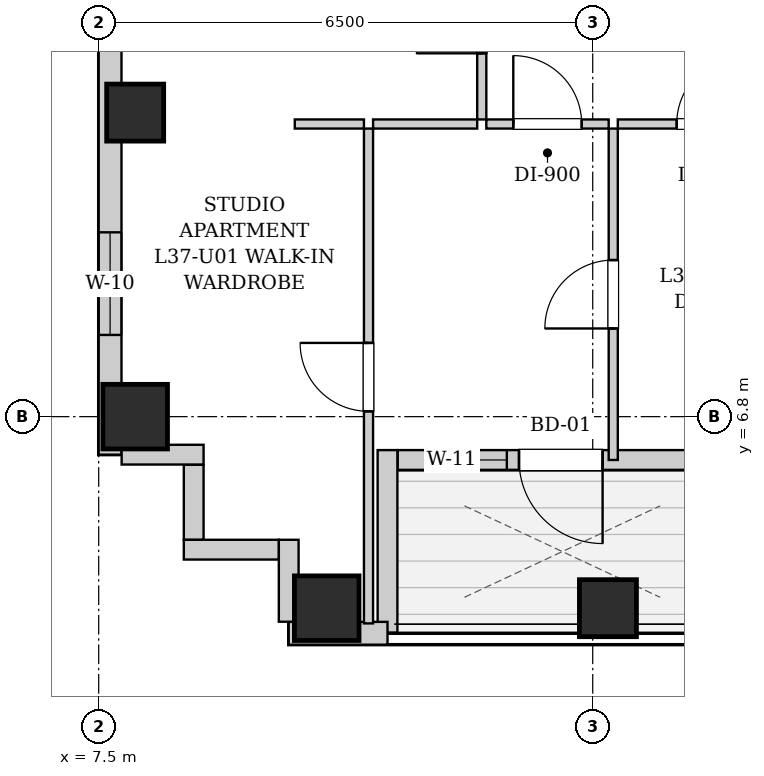
"""IFC4 building model, lengths in metres.
Left out: names, types, materials, properties, quantities, classifications, styles, units other than length and angle.
Written with IfcOpenShell. Run it as: python <this file> out.ifc"""

import sys

from ifc_helpers import new_model, si_unit, direction, frame, frame_2d, origin, origin_2d, place, context, subcontext, project, spatial, rectangle, extrude, element, fill, save


model = new_model("IFC4")
c1 = context("Model", 3, precision=1e-05, world=origin(), true_north=direction((0.0, 1.0)))
c2 = subcontext(c1, "Body", "Model", "MODEL_VIEW")
j1 = project(units=[si_unit("LENGTHUNIT", "METRE"), si_unit("PLANEANGLEUNIT", "RADIAN")], contexts=[c1])
p1 = place(None, origin())
s1 = spatial("IfcSite", under=j1, at=p1, CompositionType="ELEMENT")
p2 = place(p1, origin())
s2 = spatial("IfcBuilding", under=s1, at=p2, CompositionType="ELEMENT")
p3 = place(p2, frame((0.0, 0.0, 130.9)))
s3 = spatial("IfcBuildingStorey", under=s2, at=p3, CompositionType="ELEMENT", Elevation=130.9)
p4 = place(p3, frame((10.5, 4.28, 0.0), z_axis=(0.0, 0.0, 1.0), x_axis=(1.0, 0.0, 0.0)))
e1 = element("IfcColumn", 1, at=p4, inside=s3, PredefinedType="COLUMN", context=c2, shape_type="SweptSolid", body=[
    extrude(rectangle(XDim=0.85, YDim=0.85, at=origin_2d()), origin(), (0.0, 0.0, 1.0), 3.25),
])
p5 = place(p3, frame((14.2, 4.28, 0.0), z_axis=(0.0, 0.0, 1.0), x_axis=(1.0, 0.0, 0.0)))
e2 = element("IfcColumn", 2, at=p5, inside=s3, PredefinedType="COLUMN", context=c2, shape_type="SweptSolid", body=[
    extrude(rectangle(XDim=0.75, YDim=0.75, at=origin_2d()), origin(), (0.0, 0.0, 1.0), 3.25),
])
p6 = place(p3, frame((7.98, 6.8, 0.0), z_axis=(0.0, 0.0, 1.0), x_axis=(1.0, 0.0, 0.0)))
e3 = element("IfcColumn", 3, at=p6, inside=s3, PredefinedType="COLUMN", context=c2, shape_type="SweptSolid", body=[
    extrude(rectangle(XDim=0.85, YDim=0.85, at=origin_2d()), origin(), (0.0, 0.0, 1.0), 3.25),
])
p7 = place(p3, frame((7.98, 10.8, 0.0), z_axis=(0.0, 0.0, 1.0), x_axis=(1.0, 0.0, 0.0)))
e4 = element("IfcColumn", 4, at=p7, inside=s3, PredefinedType="COLUMN", context=c2, shape_type="SweptSolid", body=[
    extrude(rectangle(XDim=0.75, YDim=0.75, at=origin_2d()), origin(), (0.0, 0.0, 1.0), 3.25),
])
p8 = place(p3, frame((15.766, 6.23, 0.0), z_axis=(0.0, 0.0, 1.0), x_axis=(-1.0, 0.0, 0.0)))
e5 = element("IfcWall", 5, at=p8, inside=s3, PredefinedType="SOLIDWALL", context=c2, shape_type="SweptSolid", body=[
    extrude(rectangle(XDim=4.332, YDim=0.26, at=frame_2d((2.166, 0.0))), origin(), (0.0, 0.0, 1.0), 2.99),
])
p9 = place(p8, frame((1.636, 0.0, 0.0)))
e6 = element("IfcOpeningElement", 6, at=p9, cuts=e5, PredefinedType="OPENING", context=c2, shape_type="SweptSolid", body=[
    extrude(rectangle(XDim=1.1, YDim=2.0, at=frame_2d((0.55, 1.0))), frame((0.0, 0.14, 0.0), z_axis=(0.0, -1.0, 0.0), x_axis=(1.0, 0.0, 0.0)), (0.0, 0.0, 1.0), 0.28),
])
p10 = place(p8, frame((2.896, 0.0, 0.55)))
e7 = element("IfcOpeningElement", 7, at=p10, cuts=e5, PredefinedType="OPENING", context=c2, shape_type="SweptSolid", body=[
    extrude(rectangle(XDim=0.85, YDim=1.2, at=frame_2d((0.425, 0.6))), frame((0.0, 0.14, 0.0), z_axis=(0.0, -1.0, 0.0), x_axis=(1.0, 0.0, 0.0)), (0.0, 0.0, 1.0), 0.28),
])
p11 = place(p3, frame((11.3, 6.36, 0.0), z_axis=(0.0, 0.0, 1.0), x_axis=(0.0, -1.0, 0.0)))
e8 = element("IfcWall", 8, at=p11, inside=s3, PredefinedType="SOLIDWALL", context=c2, shape_type="SweptSolid", body=[
    extrude(rectangle(XDim=2.4, YDim=0.26, at=frame_2d((1.2, 0.0))), origin(), (0.0, 0.0, 1.0), 2.99),
])
p12 = place(p3, frame((11.3, 3.95, 0.0), z_axis=(0.0, 0.0, 1.0), x_axis=(-1.0, 0.0, 0.0)))
e9 = element("IfcWall", 9, at=p12, inside=s3, PredefinedType="SOLIDWALL", context=c2, shape_type="SweptSolid", body=[
    extrude(rectangle(XDim=1.3, YDim=0.3, at=frame_2d((0.65, 0.0))), origin(), (0.0, 0.0, 1.0), 2.99),
])
p13 = place(p3, frame((7.65, 6.3, 0.0), z_axis=(0.0, 0.0, 1.0), x_axis=(0.0, 1.0, 0.0)))
e10 = element("IfcWall", 10, at=p13, inside=s3, PredefinedType="SOLIDWALL", context=c2, shape_type="SweptSolid", body=[
    extrude(rectangle(XDim=34.5, YDim=0.3, at=frame_2d((17.25, 0.0))), origin(), (0.0, 0.0, 1.0), 2.99),
])
p14 = place(p13, frame((1.575, 0.0, 0.55)))
e11 = element("IfcOpeningElement", 11, at=p14, cuts=e10, PredefinedType="OPENING", context=c2, shape_type="SweptSolid", body=[
    extrude(rectangle(XDim=1.35, YDim=1.2, at=frame_2d((0.675, 0.6))), frame((0.0, 0.16, 0.0), z_axis=(0.0, -1.0, 0.0), x_axis=(1.0, 0.0, 0.0)), (0.0, 0.0, 1.0), 0.32),
])
p15 = place(p13, frame((30.075, 0.0, 0.55)))
e12 = element("IfcOpeningElement", 12, at=p15, cuts=e10, PredefinedType="OPENING", context=c2, shape_type="SweptSolid", body=[
    extrude(rectangle(XDim=1.35, YDim=1.2, at=frame_2d((0.675, 0.6))), frame((0.0, 0.16, 0.0), z_axis=(0.0, -1.0, 0.0), x_axis=(1.0, 0.0, 0.0)), (0.0, 0.0, 1.0), 0.32),
])
p16 = place(p13, frame((28.235, 0.0, 0.55)))
e13 = element("IfcOpeningElement", 13, at=p16, cuts=e10, PredefinedType="OPENING", context=c2, shape_type="SweptSolid", body=[
    extrude(rectangle(XDim=1.35, YDim=1.2, at=frame_2d((0.675, 0.6))), frame((0.0, 0.16, 0.0), z_axis=(0.0, -1.0, 0.0), x_axis=(1.0, 0.0, 0.0)), (0.0, 0.0, 1.0), 0.32),
])
p17 = place(p13, frame((11.175, 0.0, 0.55)))
e14 = element("IfcOpeningElement", 14, at=p17, cuts=e10, PredefinedType="OPENING", context=c2, shape_type="SweptSolid", body=[
    extrude(rectangle(XDim=1.35, YDim=1.2, at=frame_2d((0.675, 0.6))), frame((0.0, 0.16, 0.0), z_axis=(0.0, -1.0, 0.0), x_axis=(1.0, 0.0, 0.0)), (0.0, 0.0, 1.0), 0.32),
])
p18 = place(p13, frame((9.235, 0.0, 0.55)))
e15 = element("IfcOpeningElement", 15, at=p18, cuts=e10, PredefinedType="OPENING", context=c2, shape_type="SweptSolid", body=[
    extrude(rectangle(XDim=1.35, YDim=1.2, at=frame_2d((0.675, 0.6))), frame((0.0, 0.16, 0.0), z_axis=(0.0, -1.0, 0.0), x_axis=(1.0, 0.0, 0.0)), (0.0, 0.0, 1.0), 0.32),
])
p19 = place(p13, frame((18.2, 0.0, 0.55)))
e16 = element("IfcOpeningElement", 16, at=p19, cuts=e10, PredefinedType="OPENING", context=c2, shape_type="SweptSolid", body=[
    extrude(rectangle(XDim=1.35, YDim=1.2, at=frame_2d((0.675, 0.6))), frame((0.0, 0.16, 0.0), z_axis=(0.0, -1.0, 0.0), x_axis=(1.0, 0.0, 0.0)), (0.0, 0.0, 1.0), 0.32),
])
p20 = place(p13, frame((19.81, 0.0, 0.55)))
e17 = element("IfcOpeningElement", 17, at=p20, cuts=e10, PredefinedType="OPENING", context=c2, shape_type="SweptSolid", body=[
    extrude(rectangle(XDim=1.35, YDim=1.2, at=frame_2d((0.675, 0.6))), frame((0.0, 0.16, 0.0), z_axis=(0.0, -1.0, 0.0), x_axis=(1.0, 0.0, 0.0)), (0.0, 0.0, 1.0), 0.32),
])
p21 = place(p3, frame((10.0, 4.102, 0.0), z_axis=(0.0, 0.0, 1.0), x_axis=(0.0, 1.0, 0.0)))
e18 = element("IfcWall", 18, at=p21, inside=s3, PredefinedType="SOLIDWALL", context=c2, shape_type="SweptSolid", body=[
    extrude(rectangle(XDim=1.078, YDim=0.26, at=frame_2d((0.539, 0.0))), origin(), (0.0, 0.0, 1.0), 2.99),
])
p22 = place(p3, frame((9.868, 5.05, 0.0), z_axis=(0.0, 0.0, 1.0), x_axis=(-1.0, 0.0, 0.0)))
e19 = element("IfcWall", 19, at=p22, inside=s3, PredefinedType="SOLIDWALL", context=c2, shape_type="SweptSolid", body=[
    extrude(rectangle(XDim=1.248, YDim=0.26, at=frame_2d((0.624, 0.0))), origin(), (0.0, 0.0, 1.0), 2.99),
])
p23 = place(p3, frame((8.75, 5.182, 0.0), z_axis=(0.0, 0.0, 1.0), x_axis=(0.0, 1.0, 0.0)))
e20 = element("IfcWall", 20, at=p23, inside=s3, PredefinedType="SOLIDWALL", context=c2, shape_type="SweptSolid", body=[
    extrude(rectangle(XDim=0.986, YDim=0.26, at=frame_2d((0.493, 0.0))), origin(), (0.0, 0.0, 1.0), 2.99),
])
p24 = place(p3, frame((8.88, 6.3, 0.0), z_axis=(0.0, 0.0, 1.0), x_axis=(-1.0, 0.0, 0.0)))
e21 = element("IfcWall", 21, at=p24, inside=s3, PredefinedType="SOLIDWALL", context=c2, shape_type="SweptSolid", body=[
    extrude(rectangle(XDim=1.078, YDim=0.26, at=frame_2d((0.539, 0.0))), origin(), (0.0, 0.0, 1.0), 2.99),
])
p25 = place(p3, frame((12.54, 10.71, 0.0), z_axis=(0.0, 0.0, 1.0), x_axis=(0.0, 1.0, 0.0)))
e22 = element("IfcWall", 22, at=p25, inside=s3, PredefinedType="PARTITIONING", context=c2, shape_type="SweptSolid", body=[
    extrude(rectangle(XDim=2.6, YDim=0.12, at=frame_2d((1.3, 0.0))), origin(), (0.0, 0.0, 1.0), 2.99),
])
p26 = place(p25, frame((0.87, 0.0, 0.0)))
e23 = element("IfcOpeningElement", 23, at=p26, cuts=e22, PredefinedType="OPENING", context=c2, shape_type="SweptSolid", body=[
    extrude(rectangle(XDim=0.86, YDim=2.05, at=frame_2d((0.43, 1.025))), frame((0.0, 0.07, 0.0), z_axis=(0.0, -1.0, 0.0), x_axis=(1.0, 0.0, 0.0)), (0.0, 0.0, 1.0), 0.14),
])
p27 = place(p3, frame((10.08, 10.65, 0.0), z_axis=(0.0, 0.0, 1.0), x_axis=(1.0, 0.0, 0.0)))
e24 = element("IfcWall", 24, at=p27, inside=s3, PredefinedType="PARTITIONING", context=c2, shape_type="SweptSolid", body=[
    extrude(rectangle(XDim=0.91, YDim=0.12, at=frame_2d((0.455, 0.0))), origin(), (0.0, 0.0, 1.0), 2.99),
])
p28 = place(p3, frame((11.11, 10.65, 0.0), z_axis=(0.0, 0.0, 1.0), x_axis=(1.0, 0.0, 0.0)))
e25 = element("IfcWall", 25, at=p28, inside=s3, PredefinedType="PARTITIONING", context=c2, shape_type="SweptSolid", body=[
    extrude(rectangle(XDim=1.37, YDim=0.12, at=frame_2d((0.685, 0.0))), origin(), (0.0, 0.0, 1.0), 2.99),
])
p29 = place(p3, frame((12.6, 10.65, 0.0), z_axis=(0.0, 0.0, 1.0), x_axis=(1.0, 0.0, 0.0)))
e26 = element("IfcWall", 26, at=p29, inside=s3, PredefinedType="PARTITIONING", context=c2, shape_type="SweptSolid", body=[
    extrude(rectangle(XDim=1.61, YDim=0.12, at=frame_2d((0.805, 0.0))), origin(), (0.0, 0.0, 1.0), 2.99),
])
p30 = place(p29, frame((0.355, 0.0, 0.0)))
e27 = element("IfcOpeningElement", 27, at=p30, cuts=e26, PredefinedType="OPENING", context=c2, shape_type="SweptSolid", body=[
    extrude(rectangle(XDim=0.9, YDim=2.05, at=frame_2d((0.45, 1.025))), frame((0.0, 0.07, 0.0), z_axis=(0.0, -1.0, 0.0), x_axis=(1.0, 0.0, 0.0)), (0.0, 0.0, 1.0), 0.14),
])
p31 = place(p3, frame((14.33, 10.65, 0.0), z_axis=(0.0, 0.0, 1.0), x_axis=(1.0, 0.0, 0.0)))
e28 = element("IfcWall", 28, at=p31, inside=s3, PredefinedType="PARTITIONING", context=c2, shape_type="SweptSolid", body=[
    extrude(rectangle(XDim=2.45, YDim=0.12, at=frame_2d((1.225, 0.0))), origin(), (0.0, 0.0, 1.0), 2.99),
])
p32 = place(p31, frame((0.775, 0.0, 0.0)))
e29 = element("IfcOpeningElement", 29, at=p32, cuts=e28, PredefinedType="OPENING", context=c2, shape_type="SweptSolid", body=[
    extrude(rectangle(XDim=0.9, YDim=2.05, at=frame_2d((0.45, 1.025))), frame((0.0, 0.07, 0.0), z_axis=(0.0, -1.0, 0.0), x_axis=(1.0, 0.0, 0.0)), (0.0, 0.0, 1.0), 0.14),
])
p33 = place(p3, frame((11.05, 4.08, 0.0), z_axis=(0.0, 0.0, 1.0), x_axis=(0.0, 1.0, 0.0)))
e30 = element("IfcWall", 30, at=p33, inside=s3, PredefinedType="PARTITIONING", context=c2, shape_type="SweptSolid", body=[
    extrude(rectangle(XDim=6.51, YDim=0.12, at=frame_2d((3.255, 0.0))), origin(), (0.0, 0.0, 1.0), 2.99),
])
p34 = place(p33, frame((2.79, 0.0, 0.0)))
e31 = element("IfcOpeningElement", 31, at=p34, cuts=e30, PredefinedType="OPENING", context=c2, shape_type="SweptSolid", body=[
    extrude(rectangle(XDim=0.9, YDim=2.05, at=frame_2d((0.45, 1.025))), frame((0.0, 0.07, 0.0), z_axis=(0.0, -1.0, 0.0), x_axis=(1.0, 0.0, 0.0)), (0.0, 0.0, 1.0), 0.14),
])
p35 = place(p3, frame((14.27, 6.23, 0.0), z_axis=(0.0, 0.0, 1.0), x_axis=(0.0, 1.0, 0.0)))
e32 = element("IfcWall", 32, at=p35, inside=s3, PredefinedType="PARTITIONING", context=c2, shape_type="SweptSolid", body=[
    extrude(rectangle(XDim=4.36, YDim=0.12, at=frame_2d((2.18, 0.0))), origin(), (0.0, 0.0, 1.0), 2.99),
])
p36 = place(p35, frame((1.73, 0.0, 0.0)))
e33 = element("IfcOpeningElement", 33, at=p36, cuts=e32, PredefinedType="OPENING", context=c2, shape_type="SweptSolid", body=[
    extrude(rectangle(XDim=0.9, YDim=2.05, at=frame_2d((0.45, 1.025))), frame((0.0, 0.07, 0.0), z_axis=(0.0, -1.0, 0.0), x_axis=(1.0, 0.0, 0.0)), (0.0, 0.0, 1.0), 0.14),
])
p37 = place(p26, origin())
e34 = element("IfcDoor", 34, at=p37, inside=s3, OperationType="SINGLE_SWING_LEFT", PredefinedType="DOOR", context=c2, shape_type="SweptSolid", body=[
    extrude(rectangle(XDim=0.86, YDim=2.05, at=frame_2d((0.43, 1.025))), frame((0.0, 0.025, 0.0), z_axis=(0.0, -1.0, 0.0), x_axis=(1.0, 0.0, 0.0)), (0.0, 0.0, 1.0), 0.05),
])
fill(e23, e34)
p38 = place(p30, origin())
e35 = element("IfcDoor", 35, at=p38, inside=s3, OperationType="SINGLE_SWING_LEFT", PredefinedType="DOOR", context=c2, shape_type="SweptSolid", body=[
    extrude(rectangle(XDim=0.9, YDim=2.05, at=frame_2d((0.45, 1.025))), frame((0.0, 0.025, 0.0), z_axis=(0.0, -1.0, 0.0), x_axis=(1.0, 0.0, 0.0)), (0.0, 0.0, 1.0), 0.05),
])
fill(e27, e35)
p39 = place(p32, origin())
e36 = element("IfcDoor", 36, at=p39, inside=s3, OperationType="SINGLE_SWING_RIGHT", PredefinedType="DOOR", context=c2, shape_type="SweptSolid", body=[
    extrude(rectangle(XDim=0.9, YDim=2.05, at=frame_2d((0.45, 1.025))), frame((0.0, 0.025, 0.0), z_axis=(0.0, -1.0, 0.0), x_axis=(1.0, 0.0, 0.0)), (0.0, 0.0, 1.0), 0.05),
])
fill(e29, e36)
p40 = place(p34, origin())
e37 = element("IfcDoor", 37, at=p40, inside=s3, OperationType="SINGLE_SWING_RIGHT", PredefinedType="DOOR", context=c2, shape_type="SweptSolid", body=[
    extrude(rectangle(XDim=0.9, YDim=2.05, at=frame_2d((0.45, 1.025))), frame((0.0, 0.025, 0.0), z_axis=(0.0, -1.0, 0.0), x_axis=(1.0, 0.0, 0.0)), (0.0, 0.0, 1.0), 0.05),
])
fill(e31, e37)
p41 = place(p36, origin())
e38 = element("IfcDoor", 38, at=p41, inside=s3, OperationType="SINGLE_SWING_LEFT", PredefinedType="DOOR", context=c2, shape_type="SweptSolid", body=[
    extrude(rectangle(XDim=0.9, YDim=2.05, at=frame_2d((0.45, 1.025))), frame((0.0, 0.025, 0.0), z_axis=(0.0, -1.0, 0.0), x_axis=(1.0, 0.0, 0.0)), (0.0, 0.0, 1.0), 0.05),
])
fill(e33, e38)
p42 = place(p9, origin())
e39 = element("IfcDoor", 39, at=p42, inside=s3, OperationType="SINGLE_SWING_LEFT", PredefinedType="DOOR", context=c2, shape_type="SweptSolid", body=[
    extrude(rectangle(XDim=1.1, YDim=2.0, at=frame_2d((0.55, 1.0))), frame((0.0, 0.025, 0.0), z_axis=(0.0, -1.0, 0.0), x_axis=(1.0, 0.0, 0.0)), (0.0, 0.0, 1.0), 0.05),
])
fill(e6, e39)
p43 = place(p14, origin())
e40 = element("IfcWindow", 40, at=p43, inside=s3, PartitioningType="SINGLE_PANEL", PredefinedType="WINDOW", context=c2, shape_type="SweptSolid", body=[
    extrude(rectangle(XDim=1.35, YDim=1.2, at=frame_2d((0.675, 0.6))), frame((0.0, 0.03, 0.0), z_axis=(0.0, -1.0, 0.0), x_axis=(1.0, 0.0, 0.0)), (0.0, 0.0, 1.0), 0.06),
])
fill(e11, e40)
p44 = place(p10, origin())
e41 = element("IfcWindow", 41, at=p44, inside=s3, PartitioningType="SINGLE_PANEL", PredefinedType="WINDOW", context=c2, shape_type="SweptSolid", body=[
    extrude(rectangle(XDim=0.85, YDim=1.2, at=frame_2d((0.425, 0.6))), frame((0.0, 0.03, 0.0), z_axis=(0.0, -1.0, 0.0), x_axis=(1.0, 0.0, 0.0)), (0.0, 0.0, 1.0), 0.06),
])
fill(e7, e41)
save(model, sys.argv[1])
